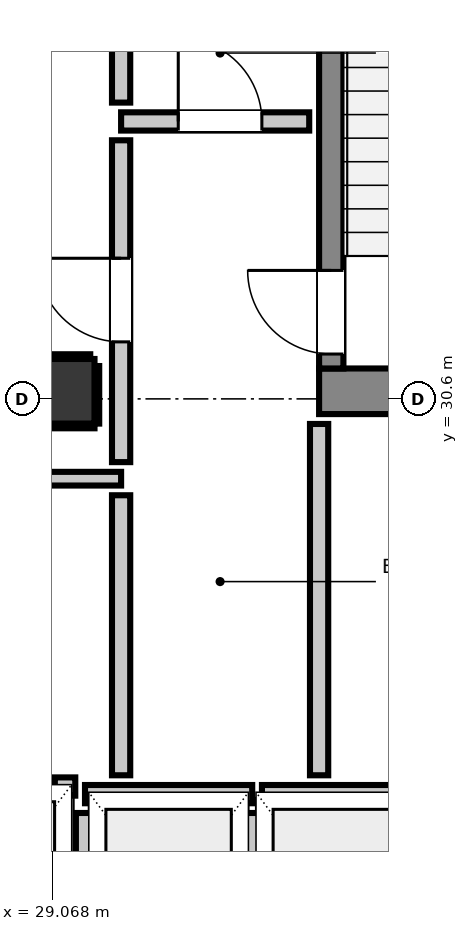
"""IFC4 building model, lengths in metres.
Left out: names, types, materials, properties, quantities, classifications, styles, units other than length and angle.
Written with IfcOpenShell. Run it as: python <this file> out.ifc"""

import sys

from ifc_helpers import new_model, si_unit, direction, frame, frame_2d, origin, origin_2d, place, context, subcontext, project, spatial, rectangle, extrude, element, fill, save


model = new_model("IFC4")
c1 = context("Model", 3, precision=1e-05, world=origin(), true_north=direction((0.0, 1.0)))
c2 = subcontext(c1, "Body", "Model", "MODEL_VIEW")
j1 = project(units=[si_unit("LENGTHUNIT", "METRE"), si_unit("PLANEANGLEUNIT", "RADIAN")], contexts=[c1])
p1 = place(None, origin())
s1 = spatial("IfcSite", under=j1, at=p1, CompositionType="ELEMENT")
p2 = place(p1, origin())
s2 = spatial("IfcBuilding", under=s1, at=p2, CompositionType="ELEMENT")
p3 = place(p2, frame((0.0, 0.0, 257.84)))
s3 = spatial("IfcBuildingStorey", under=s2, at=p3, CompositionType="ELEMENT", Elevation=257.84)
p4 = place(p3, frame((32.58, 30.7, 0.0), z_axis=(0.0, 0.0, 1.0), x_axis=(1.0, 0.0, 0.0)))
e1 = element("IfcWall", 1, at=p4, inside=s3, PredefinedType="SHEAR", context=c2, shape_type="SweptSolid", body=[
    extrude(rectangle(XDim=3.54, YDim=0.6, at=frame_2d((1.77, 0.0))), origin(), (0.0, 0.0, 1.0), 4.4),
])
p5 = place(p3, frame((32.74, 31.0, 0.0), z_axis=(0.0, 0.0, 1.0), x_axis=(0.0, 1.0, 0.0)))
e2 = element("IfcWall", 2, at=p5, inside=s3, PredefinedType="SHEAR", context=c2, shape_type="SweptSolid", body=[
    extrude(rectangle(XDim=7.8, YDim=0.32, at=frame_2d((3.9, 0.0))), origin(), (0.0, 0.0, 1.0), 4.4),
])
p6 = place(p5, frame((0.19, 0.0, 0.0)))
e3 = element("IfcOpeningElement", 3, at=p6, cuts=e2, PredefinedType="OPENING", context=c2, shape_type="SweptSolid", body=[
    extrude(rectangle(XDim=1.1, YDim=2.15, at=frame_2d((0.55, 1.075))), frame((0.0, 0.17, 0.0), z_axis=(0.0, -1.0, 0.0), x_axis=(1.0, 0.0, 0.0)), (0.0, 0.0, 1.0), 0.34),
])
p7 = place(p3, frame((29.2, 30.7, 0.0), z_axis=(0.0, 0.0, 1.0), x_axis=(1.0, 0.0, 0.0)))
e4 = element("IfcColumn", 4, at=p7, inside=s3, PredefinedType="COLUMN", context=c2, shape_type="SweptSolid", body=[
    extrude(rectangle(XDim=0.85, YDim=0.85, at=origin_2d()), origin(), (0.0, 0.0, 1.0), 4.4),
])
p8 = place(p3, frame((29.5, 25.4, 0.0), z_axis=(0.0, 0.0, 1.0), x_axis=(1.0, 0.0, 0.0)))
e5 = element("IfcWall", 5, at=p8, inside=s3, PredefinedType="PARTITIONING", context=c2, shape_type="SweptSolid", body=[
    extrude(rectangle(XDim=2.2, YDim=0.24, at=frame_2d((1.1, 0.0))), origin(), (0.0, 0.0, 1.0), 4.18),
])
p9 = place(p3, frame((29.5, 22.848, 0.0), z_axis=(0.0, 0.0, 1.0), x_axis=(0.0, 1.0, 0.0)))
e6 = element("IfcWall", 6, at=p9, inside=s3, PredefinedType="PARTITIONING", context=c2, shape_type="SweptSolid", body=[
    extrude(rectangle(XDim=2.304, YDim=0.24, at=frame_2d((1.152, 0.0))), origin(), (0.0, 0.0, 1.0), 3.415),
])
p10 = place(p3, frame((31.7, 22.848, 0.0), z_axis=(0.0, 0.0, 1.0), x_axis=(0.0, 1.0, 0.0)))
e7 = element("IfcWall", 7, at=p10, inside=s3, PredefinedType="PARTITIONING", context=c2, shape_type="SweptSolid", body=[
    extrude(rectangle(XDim=2.304, YDim=0.24, at=frame_2d((1.152, 0.0))), origin(), (0.0, 0.0, 1.0), 4.18),
])
p11 = place(p3, frame((31.828, 25.4, 0.0), z_axis=(0.0, 0.0, 1.0), x_axis=(1.0, 0.0, 0.0)))
e8 = element("IfcWall", 8, at=p11, inside=s3, PredefinedType="PARTITIONING", context=c2, shape_type="SweptSolid", body=[
    extrude(rectangle(XDim=2.072, YDim=0.24, at=frame_2d((1.036, 0.0))), origin(), (0.0, 0.0, 1.0), 4.18),
])
p12 = place(p3, frame((29.103, 25.5, 0.0), z_axis=(0.0, 0.0, 1.0), x_axis=(1.0, 0.0, 0.0)))
e9 = element("IfcWall", 9, at=p12, inside=s3, PredefinedType="PARTITIONING", context=c2, shape_type="SweptSolid", body=[
    extrude(rectangle(XDim=0.269, YDim=0.24, at=frame_2d((0.135, 0.0))), origin(), (0.0, 0.0, 1.0), 4.18),
])
p13 = place(p3, frame((29.975, 34.25, 0.0), z_axis=(0.0, 0.0, 1.0), x_axis=(1.0, 0.0, 0.0)))
e10 = element("IfcWall", 10, at=p13, inside=s3, PredefinedType="PARTITIONING", context=c2, shape_type="SweptSolid", body=[
    extrude(rectangle(XDim=2.475, YDim=0.24, at=frame_2d((1.237, 0.0))), origin(), (0.0, 0.0, 1.0), 4.18),
])
p14 = place(p13, frame((0.752, 0.0, 0.0)))
e11 = element("IfcOpeningElement", 11, at=p14, cuts=e10, PredefinedType="OPENING", context=c2, shape_type="SweptSolid", body=[
    extrude(rectangle(XDim=1.1, YDim=2.15, at=frame_2d((0.55, 1.075))), frame((0.0, 0.13, 0.0), z_axis=(0.0, -1.0, 0.0), x_axis=(1.0, 0.0, 0.0)), (0.0, 0.0, 1.0), 0.26),
])
p15 = place(p3, frame((28.593, 29.55, 0.0), z_axis=(0.0, 0.0, 1.0), x_axis=(1.0, 0.0, 0.0)))
e12 = element("IfcWall", 12, at=p15, inside=s3, PredefinedType="PARTITIONING", context=c2, shape_type="SweptSolid", body=[
    extrude(rectangle(XDim=1.382, YDim=0.18, at=frame_2d((0.691, 0.0))), origin(), (0.0, 0.0, 1.0), 4.18),
])
p16 = place(p3, frame((29.975, 25.648, 0.0), z_axis=(0.0, 0.0, 1.0), x_axis=(0.0, 1.0, 0.0)))
e13 = element("IfcWall", 13, at=p16, inside=s3, PredefinedType="PARTITIONING", context=c2, shape_type="SweptSolid", body=[
    extrude(rectangle(XDim=3.684, YDim=0.24, at=frame_2d((1.842, 0.0))), origin(), (0.0, 0.0, 1.0), 4.18),
])
p17 = place(p3, frame((29.975, 29.768, 0.0), z_axis=(0.0, 0.0, 1.0), x_axis=(0.0, 1.0, 0.0)))
e14 = element("IfcWall", 14, at=p17, inside=s3, PredefinedType="PARTITIONING", context=c2, shape_type="SweptSolid", body=[
    extrude(rectangle(XDim=4.234, YDim=0.24, at=frame_2d((2.117, 0.0))), origin(), (0.0, 0.0, 1.0), 4.18),
])
p18 = place(p17, frame((1.582, 0.0, 0.0)))
e15 = element("IfcOpeningElement", 15, at=p18, cuts=e14, PredefinedType="OPENING", context=c2, shape_type="SweptSolid", body=[
    extrude(rectangle(XDim=1.1, YDim=2.15, at=frame_2d((0.55, 1.075))), frame((0.0, 0.13, 0.0), z_axis=(0.0, -1.0, 0.0), x_axis=(1.0, 0.0, 0.0)), (0.0, 0.0, 1.0), 0.26),
])
p19 = place(p3, frame((29.975, 34.498, 0.0), z_axis=(0.0, 0.0, 1.0), x_axis=(0.0, 1.0, 0.0)))
e16 = element("IfcWall", 16, at=p19, inside=s3, PredefinedType="PARTITIONING", context=c2, shape_type="SweptSolid", body=[
    extrude(rectangle(XDim=0.924, YDim=0.24, at=frame_2d((0.462, 0.0))), origin(), (0.0, 0.0, 1.0), 4.18),
])
p20 = place(p3, frame((32.58, 25.648, 0.0), z_axis=(0.0, 0.0, 1.0), x_axis=(0.0, 1.0, 0.0)))
e17 = element("IfcWall", 17, at=p20, inside=s3, PredefinedType="PARTITIONING", context=c2, shape_type="SweptSolid", body=[
    extrude(rectangle(XDim=4.622, YDim=0.24, at=frame_2d((2.311, 0.0))), origin(), (0.0, 0.0, 1.0), 4.18),
])
p21 = place(p3, frame((28.775, 30.243, 0.0), z_axis=(0.0, 0.0, 1.0), x_axis=(1.0, 0.0, 0.0)))
e18 = element("IfcWall", 18, at=p21, inside=s3, PredefinedType="PARTITIONING", context=c2, shape_type="SweptSolid", body=[
    extrude(rectangle(XDim=0.85, YDim=0.06, at=frame_2d((0.425, 0.0))), origin(), (0.0, 0.0, 1.0), 1.45),
])
p22 = place(p3, frame((28.775, 31.157, 0.0), z_axis=(0.0, 0.0, 1.0), x_axis=(1.0, 0.0, 0.0)))
e19 = element("IfcWall", 19, at=p22, inside=s3, PredefinedType="PARTITIONING", context=c2, shape_type="SweptSolid", body=[
    extrude(rectangle(XDim=0.794, YDim=0.06, at=frame_2d((0.397, 0.0))), origin(), (0.0, 0.0, 1.0), 1.45),
])
p23 = place(p3, frame((29.657, 30.275, 0.0), z_axis=(0.0, 0.0, 1.0), x_axis=(0.0, 1.0, 0.0)))
e20 = element("IfcWall", 20, at=p23, inside=s3, PredefinedType="PARTITIONING", context=c2, shape_type="SweptSolid", body=[
    extrude(rectangle(XDim=0.757, YDim=0.06, at=frame_2d((0.378, 0.0))), origin(), (0.0, 0.0, 1.0), 1.45),
])
p24 = place(p6, origin())
e21 = element("IfcDoor", 21, at=p24, inside=s3, OperationType="SINGLE_SWING_RIGHT", PredefinedType="DOOR", context=c2, shape_type="SweptSolid", body=[
    extrude(rectangle(XDim=1.1, YDim=2.15, at=frame_2d((0.55, 1.075))), frame((0.0, 0.025, 0.0), z_axis=(0.0, -1.0, 0.0), x_axis=(1.0, 0.0, 0.0)), (0.0, 0.0, 1.0), 0.05),
])
fill(e3, e21)
p25 = place(p18, origin())
e22 = element("IfcDoor", 22, at=p25, inside=s3, OperationType="SINGLE_SWING_RIGHT", PredefinedType="DOOR", context=c2, shape_type="SweptSolid", body=[
    extrude(rectangle(XDim=1.1, YDim=2.15, at=frame_2d((0.55, 1.075))), frame((0.0, 0.025, 0.0), z_axis=(0.0, -1.0, 0.0), x_axis=(1.0, 0.0, 0.0)), (0.0, 0.0, 1.0), 0.05),
])
fill(e15, e22)
p26 = place(p14, origin())
e23 = element("IfcDoor", 23, at=p26, inside=s3, OperationType="SINGLE_SWING_LEFT", PredefinedType="DOOR", context=c2, shape_type="SweptSolid", body=[
    extrude(rectangle(XDim=1.1, YDim=2.15, at=frame_2d((0.55, 1.075))), frame((0.0, 0.025, 0.0), z_axis=(0.0, -1.0, 0.0), x_axis=(1.0, 0.0, 0.0)), (0.0, 0.0, 1.0), 0.05),
])
fill(e11, e23)
save(model, sys.argv[1])
